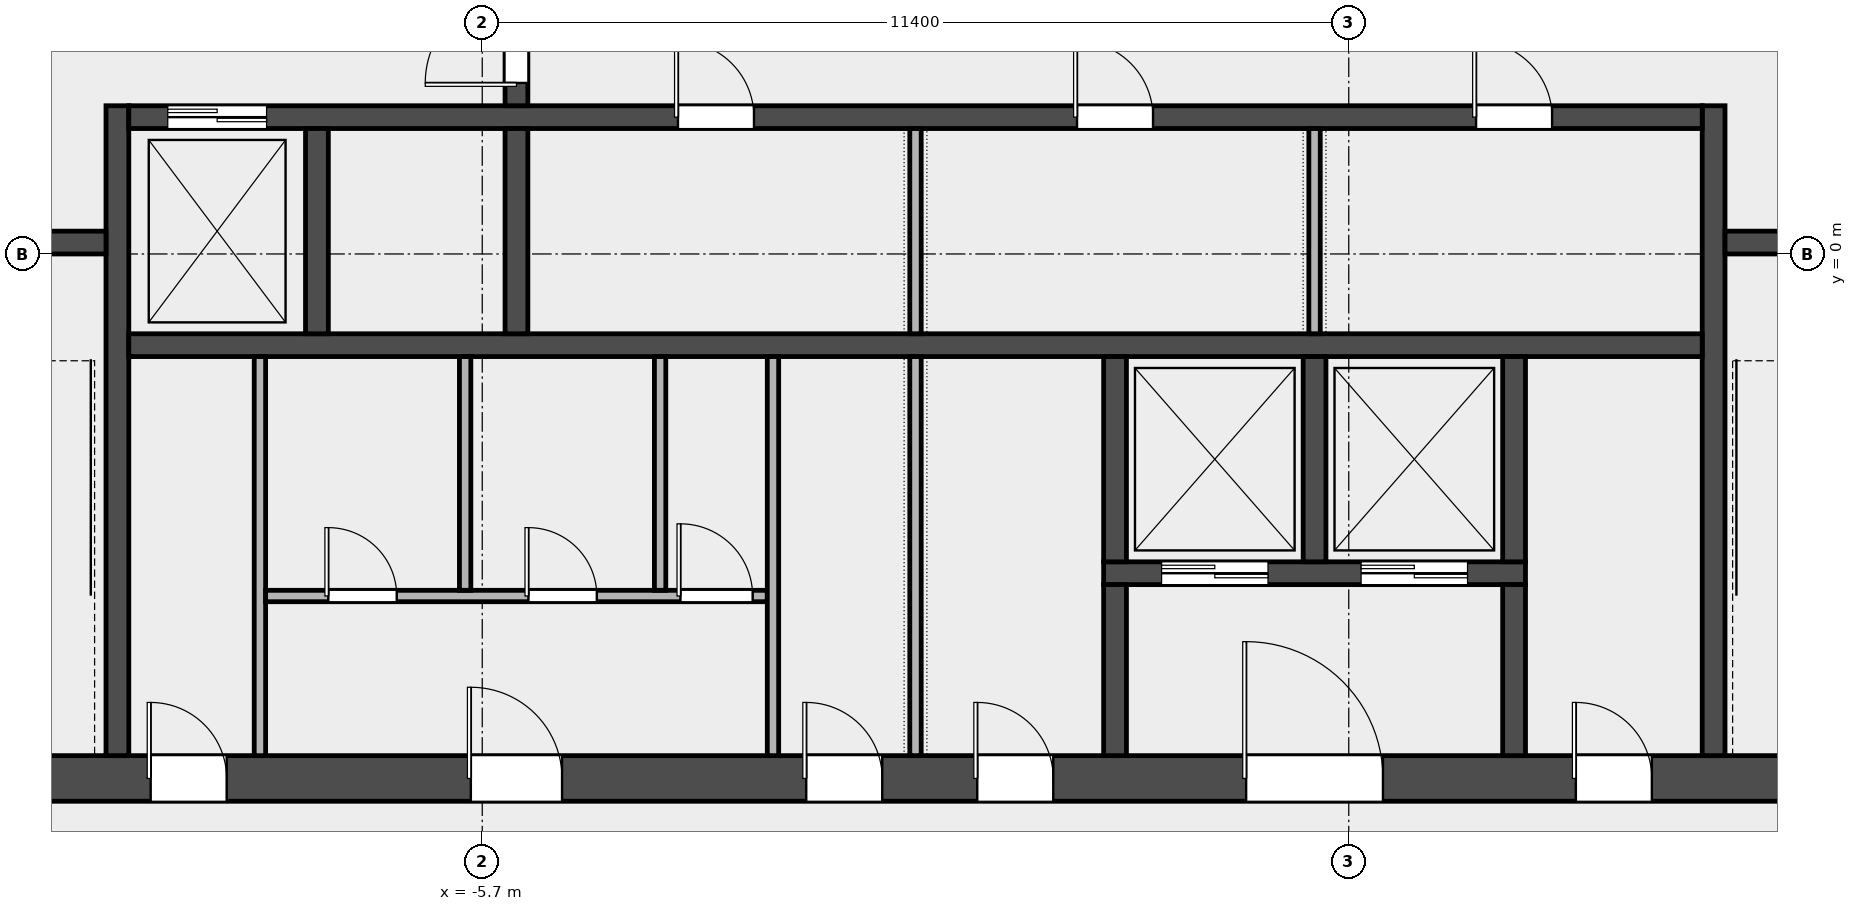
"""IFC4 building model, lengths in metres.
Left out: names, types, materials, properties, quantities, classifications, styles, units other than length and angle.
Written with IfcOpenShell. Run it as: python <this file> out.ifc"""

import sys

from ifc_helpers import new_model, si_unit, direction, frame, frame_2d, origin, place, context, subcontext, project, spatial, rectangle, extrude, element, fill, save


model = new_model("IFC4")
c1 = context("Model", 3, precision=1e-05, world=origin(), true_north=direction((0.0, 1.0)))
c2 = subcontext(c1, "Body", "Model", "MODEL_VIEW")
j1 = project(units=[si_unit("LENGTHUNIT", "METRE"), si_unit("PLANEANGLEUNIT", "RADIAN")], contexts=[c1])
p1 = place(None, origin())
s1 = spatial("IfcSite", under=j1, at=p1, CompositionType="ELEMENT")
p2 = place(p1, origin())
s2 = spatial("IfcBuilding", under=s1, at=p2, CompositionType="ELEMENT")
p3 = place(p2, frame((0.0, 0.0, 271.4)))
s3 = spatial("IfcBuildingStorey", under=s2, at=p3, CompositionType="ELEMENT", Elevation=271.4)
p4 = place(p3, frame((-14.4, -6.9, 0.0), z_axis=(0.0, 0.0, 1.0), x_axis=(1.0, 0.0, 0.0)))
e1 = element("IfcWall", 1, at=p4, inside=s3, PredefinedType="SHEAR", context=c2, shape_type="SweptSolid", body=[
    extrude(rectangle(XDim=28.8, YDim=0.6, at=frame_2d((14.4, 0.0))), origin(), (0.0, 0.0, 1.0), 3.7),
])
p5 = place(p4, frame((4.337, 0.0, 0.0)))
e2 = element("IfcOpeningElement", 2, at=p5, cuts=e1, PredefinedType="OPENING", context=c2, shape_type="SweptSolid", body=[
    extrude(rectangle(XDim=1.0, YDim=2.1, at=frame_2d((0.5, 1.05))), frame((0.0, 0.312, 0.0), z_axis=(0.0, -1.0, 0.0), x_axis=(1.0, 0.0, 0.0)), (0.0, 0.0, 1.0), 0.624),
])
p6 = place(p4, frame((8.55, 0.0, 0.0)))
e3 = element("IfcOpeningElement", 3, at=p6, cuts=e1, PredefinedType="OPENING", context=c2, shape_type="SweptSolid", body=[
    extrude(rectangle(XDim=1.2, YDim=2.1, at=frame_2d((0.6, 1.05))), frame((0.0, 0.312, 0.0), z_axis=(0.0, -1.0, 0.0), x_axis=(1.0, 0.0, 0.0)), (0.0, 0.0, 1.0), 0.624),
])
p7 = place(p4, frame((12.962, 0.0, 0.0)))
e4 = element("IfcOpeningElement", 4, at=p7, cuts=e1, PredefinedType="OPENING", context=c2, shape_type="SweptSolid", body=[
    extrude(rectangle(XDim=1.0, YDim=2.1, at=frame_2d((0.5, 1.05))), frame((0.0, 0.312, 0.0), z_axis=(0.0, -1.0, 0.0), x_axis=(1.0, 0.0, 0.0)), (0.0, 0.0, 1.0), 0.624),
])
p8 = place(p4, frame((15.212, 0.0, 0.0)))
e5 = element("IfcOpeningElement", 5, at=p8, cuts=e1, PredefinedType="OPENING", context=c2, shape_type="SweptSolid", body=[
    extrude(rectangle(XDim=1.0, YDim=2.1, at=frame_2d((0.5, 1.05))), frame((0.0, 0.312, 0.0), z_axis=(0.0, -1.0, 0.0), x_axis=(1.0, 0.0, 0.0)), (0.0, 0.0, 1.0), 0.624),
])
p9 = place(p4, frame((18.75, 0.0, 0.0)))
e6 = element("IfcOpeningElement", 6, at=p9, cuts=e1, PredefinedType="OPENING", context=c2, shape_type="SweptSolid", body=[
    extrude(rectangle(XDim=1.8, YDim=2.1, at=frame_2d((0.9, 1.05))), frame((0.0, 0.312, 0.0), z_axis=(0.0, -1.0, 0.0), x_axis=(1.0, 0.0, 0.0)), (0.0, 0.0, 1.0), 0.624),
])
p10 = place(p4, frame((23.087, 0.0, 0.0)))
e7 = element("IfcOpeningElement", 7, at=p10, cuts=e1, PredefinedType="OPENING", context=c2, shape_type="SweptSolid", body=[
    extrude(rectangle(XDim=1.0, YDim=2.1, at=frame_2d((0.5, 1.05))), frame((0.0, 0.312, 0.0), z_axis=(0.0, -1.0, 0.0), x_axis=(1.0, 0.0, 0.0)), (0.0, 0.0, 1.0), 0.624),
])
for number, where, z_axis, x_axis in (
    (8, (-10.5, -6.6, 0.0), (0.0, 0.0, 1.0), (0.0, 1.0, 0.0)),
    (9, (10.5, -6.6, 0.0), (0.0, 0.0, 1.0), (0.0, 1.0, 0.0)),
):
    element("IfcWall", number, at=place(p3, frame(where, z_axis=z_axis, x_axis=x_axis)), inside=s3, PredefinedType="SHEAR", context=c2, shape_type="SweptSolid", body=[
        extrude(rectangle(XDim=8.55, YDim=0.3, at=frame_2d((4.275, 0.0))), origin(), (0.0, 0.0, 1.0), 3.7),
    ])
p11 = place(p3, frame((-13.8, 0.15, 0.0), z_axis=(0.0, 0.0, 1.0), x_axis=(1.0, 0.0, 0.0)))
e10 = element("IfcWall", 10, at=p11, inside=s3, PredefinedType="SOLIDWALL", context=c2, shape_type="SweptSolid", body=[
    extrude(rectangle(XDim=3.15, YDim=0.3, at=frame_2d((1.575, 0.0))), origin(), (0.0, 0.0, 1.0), 3.7),
])
p12 = place(p11, frame((0.975, 0.0, 0.0)))
e11 = element("IfcOpeningElement", 11, at=p12, cuts=e10, PredefinedType="OPENING", context=c2, shape_type="SweptSolid", body=[
    extrude(rectangle(XDim=1.1, YDim=2.1, at=frame_2d((0.55, 1.05))), frame((0.0, 0.162, 0.0), z_axis=(0.0, -1.0, 0.0), x_axis=(1.0, 0.0, 0.0)), (0.0, 0.0, 1.0), 0.324),
])
p13 = place(p3, frame((10.65, 0.15, 0.0), z_axis=(0.0, 0.0, 1.0), x_axis=(1.0, 0.0, 0.0)))
e12 = element("IfcWall", 12, at=p13, inside=s3, PredefinedType="SOLIDWALL", context=c2, shape_type="SweptSolid", body=[
    extrude(rectangle(XDim=3.15, YDim=0.3, at=frame_2d((1.575, 0.0))), origin(), (0.0, 0.0, 1.0), 3.7),
])
p14 = place(p13, frame((1.025, 0.0, 0.0)))
e13 = element("IfcOpeningElement", 13, at=p14, cuts=e12, PredefinedType="OPENING", context=c2, shape_type="SweptSolid", body=[
    extrude(rectangle(XDim=1.1, YDim=2.1, at=frame_2d((0.55, 1.05))), frame((0.0, 0.162, 0.0), z_axis=(0.0, -1.0, 0.0), x_axis=(1.0, 0.0, 0.0)), (0.0, 0.0, 1.0), 0.324),
])
p15 = place(p3, frame((-10.35, -1.2, 0.0), z_axis=(0.0, 0.0, 1.0), x_axis=(1.0, 0.0, 0.0)))
e14 = element("IfcWall", 14, at=p15, inside=s3, PredefinedType="SOLIDWALL", context=c2, shape_type="SweptSolid", body=[
    extrude(rectangle(XDim=20.7, YDim=0.3, at=frame_2d((10.35, 0.0))), origin(), (0.0, 0.0, 1.0), 3.7),
])
p16 = place(p3, frame((-10.35, 1.8, 0.0), z_axis=(0.0, 0.0, 1.0), x_axis=(1.0, 0.0, 0.0)))
e15 = element("IfcWall", 15, at=p16, inside=s3, PredefinedType="SOLIDWALL", context=c2, shape_type="SweptSolid", body=[
    extrude(rectangle(XDim=20.7, YDim=0.3, at=frame_2d((10.35, 0.0))), origin(), (0.0, 0.0, 1.0), 3.7),
])
p17 = place(p16, frame((0.512, 0.0, 0.0)))
e16 = element("IfcOpeningElement", 16, at=p17, cuts=e15, PredefinedType="OPENING", context=c2, shape_type="SweptSolid", body=[
    extrude(rectangle(XDim=1.3, YDim=2.1, at=frame_2d((0.65, 1.05))), frame((0.0, 0.162, 0.0), z_axis=(0.0, -1.0, 0.0), x_axis=(1.0, 0.0, 0.0)), (0.0, 0.0, 1.0), 0.324),
])
p18 = place(p16, frame((7.225, 0.0, 0.0)))
e17 = element("IfcOpeningElement", 17, at=p18, cuts=e15, PredefinedType="OPENING", context=c2, shape_type="SweptSolid", body=[
    extrude(rectangle(XDim=1.0, YDim=2.1, at=frame_2d((0.5, 1.05))), frame((0.0, 0.162, 0.0), z_axis=(0.0, -1.0, 0.0), x_axis=(1.0, 0.0, 0.0)), (0.0, 0.0, 1.0), 0.324),
])
p19 = place(p16, frame((12.475, 0.0, 0.0)))
e18 = element("IfcOpeningElement", 18, at=p19, cuts=e15, PredefinedType="OPENING", context=c2, shape_type="SweptSolid", body=[
    extrude(rectangle(XDim=1.0, YDim=2.1, at=frame_2d((0.5, 1.05))), frame((0.0, 0.162, 0.0), z_axis=(0.0, -1.0, 0.0), x_axis=(1.0, 0.0, 0.0)), (0.0, 0.0, 1.0), 0.324),
])
p20 = place(p16, frame((17.725, 0.0, 0.0)))
e19 = element("IfcOpeningElement", 19, at=p20, cuts=e15, PredefinedType="OPENING", context=c2, shape_type="SweptSolid", body=[
    extrude(rectangle(XDim=1.0, YDim=2.1, at=frame_2d((0.5, 1.05))), frame((0.0, 0.162, 0.0), z_axis=(0.0, -1.0, 0.0), x_axis=(1.0, 0.0, 0.0)), (0.0, 0.0, 1.0), 0.324),
])
for number, where, z_axis, x_axis in (
    (20, (-7.875, -1.05, 0.0), (0.0, 0.0, 1.0), (0.0, 1.0, 0.0)),
    (21, (-5.25, -1.05, 0.0), (0.0, 0.0, 1.0), (0.0, 1.0, 0.0)),
):
    element("IfcWall", number, at=place(p3, frame(where, z_axis=z_axis, x_axis=x_axis)), inside=s3, PredefinedType="SOLIDWALL", context=c2, shape_type="SweptSolid", body=[
        extrude(rectangle(XDim=2.7, YDim=0.3, at=frame_2d((1.35, 0.0))), origin(), (0.0, 0.0, 1.0), 3.7),
    ])
p21 = place(p3, frame((-5.25, 1.95, 0.0), z_axis=(0.0, 0.0, 1.0), x_axis=(0.0, 1.0, 0.0)))
e22 = element("IfcWall", 22, at=p21, inside=s3, PredefinedType="SOLIDWALL", context=c2, shape_type="SweptSolid", body=[
    extrude(rectangle(XDim=3.3, YDim=0.3, at=frame_2d((1.65, 0.0))), origin(), (0.0, 0.0, 1.0), 3.7),
])
p22 = place(p21, frame((0.3, 0.0, 0.0)))
e23 = element("IfcOpeningElement", 23, at=p22, cuts=e22, PredefinedType="OPENING", context=c2, shape_type="SweptSolid", body=[
    extrude(rectangle(XDim=1.2, YDim=2.1, at=frame_2d((0.6, 1.05))), frame((0.0, 0.162, 0.0), z_axis=(0.0, -1.0, 0.0), x_axis=(1.0, 0.0, 0.0)), (0.0, 0.0, 1.0), 0.324),
])
p23 = place(p21, frame((1.8, 0.0, 0.0)))
e24 = element("IfcOpeningElement", 24, at=p23, cuts=e22, PredefinedType="OPENING", context=c2, shape_type="SweptSolid", body=[
    extrude(rectangle(XDim=1.2, YDim=2.1, at=frame_2d((0.6, 1.05))), frame((0.0, 0.162, 0.0), z_axis=(0.0, -1.0, 0.0), x_axis=(1.0, 0.0, 0.0)), (0.0, 0.0, 1.0), 0.324),
])
p24 = place(p3, frame((2.475, -4.2, 0.0), z_axis=(0.0, 0.0, 1.0), x_axis=(1.0, 0.0, 0.0)))
e25 = element("IfcWall", 25, at=p24, inside=s3, PredefinedType="SOLIDWALL", context=c2, shape_type="SweptSolid", body=[
    extrude(rectangle(XDim=5.55, YDim=0.3, at=frame_2d((2.775, 0.0))), origin(), (0.0, 0.0, 1.0), 3.7),
])
p25 = place(p24, frame((0.762, 0.0, 0.0)))
e26 = element("IfcOpeningElement", 26, at=p25, cuts=e25, PredefinedType="OPENING", context=c2, shape_type="SweptSolid", body=[
    extrude(rectangle(XDim=1.4, YDim=2.1, at=frame_2d((0.7, 1.05))), frame((0.0, 0.162, 0.0), z_axis=(0.0, -1.0, 0.0), x_axis=(1.0, 0.0, 0.0)), (0.0, 0.0, 1.0), 0.324),
])
p26 = place(p24, frame((3.387, 0.0, 0.0)))
e27 = element("IfcOpeningElement", 27, at=p26, cuts=e25, PredefinedType="OPENING", context=c2, shape_type="SweptSolid", body=[
    extrude(rectangle(XDim=1.4, YDim=2.1, at=frame_2d((0.7, 1.05))), frame((0.0, 0.162, 0.0), z_axis=(0.0, -1.0, 0.0), x_axis=(1.0, 0.0, 0.0)), (0.0, 0.0, 1.0), 0.324),
])
p27 = place(p3, frame((2.625, -4.05, 0.0), z_axis=(0.0, 0.0, 1.0), x_axis=(0.0, 1.0, 0.0)))
e28 = element("IfcWall", 28, at=p27, inside=s3, PredefinedType="SOLIDWALL", context=c2, shape_type="SweptSolid", body=[
    extrude(rectangle(XDim=2.7, YDim=0.3, at=frame_2d((1.35, 0.0))), origin(), (0.0, 0.0, 1.0), 3.7),
])
p28 = place(p3, frame((2.625, -6.6, 0.0), z_axis=(0.0, 0.0, 1.0), x_axis=(0.0, 1.0, 0.0)))
e29 = element("IfcWall", 29, at=p28, inside=s3, PredefinedType="SOLIDWALL", context=c2, shape_type="SweptSolid", body=[
    extrude(rectangle(XDim=2.25, YDim=0.3, at=frame_2d((1.125, 0.0))), origin(), (0.0, 0.0, 1.0), 3.7),
])
for number, where, z_axis, x_axis in (
    (30, (5.25, -4.05, 0.0), (0.0, 0.0, 1.0), (0.0, 1.0, 0.0)),
    (31, (7.875, -4.05, 0.0), (0.0, 0.0, 1.0), (0.0, 1.0, 0.0)),
):
    element("IfcWall", number, at=place(p3, frame(where, z_axis=z_axis, x_axis=x_axis)), inside=s3, PredefinedType="SOLIDWALL", context=c2, shape_type="SweptSolid", body=[
        extrude(rectangle(XDim=2.7, YDim=0.3, at=frame_2d((1.35, 0.0))), origin(), (0.0, 0.0, 1.0), 3.7),
    ])
p29 = place(p3, frame((7.875, -6.6, 0.0), z_axis=(0.0, 0.0, 1.0), x_axis=(0.0, 1.0, 0.0)))
e32 = element("IfcWall", 32, at=p29, inside=s3, PredefinedType="SOLIDWALL", context=c2, shape_type="SweptSolid", body=[
    extrude(rectangle(XDim=2.25, YDim=0.3, at=frame_2d((1.125, 0.0))), origin(), (0.0, 0.0, 1.0), 3.7),
])
p30 = place(p3, frame((-8.625, -6.6, 0.0), z_axis=(0.0, 0.0, 1.0), x_axis=(0.0, 1.0, 0.0)))
e33 = element("IfcWall", 33, at=p30, inside=s3, PredefinedType="PARTITIONING", context=c2, shape_type="SweptSolid", body=[
    extrude(rectangle(XDim=5.25, YDim=0.15, at=frame_2d((2.625, 0.0))), origin(), (0.0, 0.0, 1.0), 3.7),
])
p31 = place(p3, frame((-8.55, -4.5, 0.0), z_axis=(0.0, 0.0, 1.0), x_axis=(1.0, 0.0, 0.0)))
e34 = element("IfcWall", 34, at=p31, inside=s3, PredefinedType="PARTITIONING", context=c2, shape_type="SweptSolid", body=[
    extrude(rectangle(XDim=6.6, YDim=0.15, at=frame_2d((3.3, 0.0))), origin(), (0.0, 0.0, 1.0), 3.7),
])
p32 = place(p31, frame((0.825, 0.0, 0.0)))
e35 = element("IfcOpeningElement", 35, at=p32, cuts=e34, PredefinedType="OPENING", context=c2, shape_type="SweptSolid", body=[
    extrude(rectangle(XDim=0.9, YDim=2.1, at=frame_2d((0.45, 1.05))), frame((0.0, 0.087, 0.0), z_axis=(0.0, -1.0, 0.0), x_axis=(1.0, 0.0, 0.0)), (0.0, 0.0, 1.0), 0.174),
])
p33 = place(p31, frame((3.458, 0.0, 0.0)))
e36 = element("IfcOpeningElement", 36, at=p33, cuts=e34, PredefinedType="OPENING", context=c2, shape_type="SweptSolid", body=[
    extrude(rectangle(XDim=0.9, YDim=2.1, at=frame_2d((0.45, 1.05))), frame((0.0, 0.087, 0.0), z_axis=(0.0, -1.0, 0.0), x_axis=(1.0, 0.0, 0.0)), (0.0, 0.0, 1.0), 0.174),
])
p34 = place(p31, frame((5.458, 0.0, 0.0)))
e37 = element("IfcOpeningElement", 37, at=p34, cuts=e34, PredefinedType="OPENING", context=c2, shape_type="SweptSolid", body=[
    extrude(rectangle(XDim=0.95, YDim=2.1, at=frame_2d((0.475, 1.05))), frame((0.0, 0.087, 0.0), z_axis=(0.0, -1.0, 0.0), x_axis=(1.0, 0.0, 0.0)), (0.0, 0.0, 1.0), 0.174),
])
for number, where, z_axis, x_axis in (
    (38, (-5.925, -4.425, 0.0), (0.0, 0.0, 1.0), (0.0, 1.0, 0.0)),
    (39, (-3.36, -4.425, 0.0), (0.0, 0.0, 1.0), (0.0, 1.0, 0.0)),
):
    element("IfcWall", number, at=place(p3, frame(where, z_axis=z_axis, x_axis=x_axis)), inside=s3, PredefinedType="PARTITIONING", context=c2, shape_type="SweptSolid", body=[
        extrude(rectangle(XDim=3.075, YDim=0.15, at=frame_2d((1.538, 0.0))), origin(), (0.0, 0.0, 1.0), 3.7),
    ])
for number, where, z_axis, x_axis in (
    (40, (-1.875, -6.6, 0.0), (0.0, 0.0, 1.0), (0.0, 1.0, 0.0)),
    (41, (0.0, -6.6, 0.0), (0.0, 0.0, 1.0), (0.0, 1.0, 0.0)),
):
    element("IfcWall", number, at=place(p3, frame(where, z_axis=z_axis, x_axis=x_axis)), inside=s3, PredefinedType="PARTITIONING", context=c2, shape_type="SweptSolid", body=[
        extrude(rectangle(XDim=5.25, YDim=0.15, at=frame_2d((2.625, 0.0))), origin(), (0.0, 0.0, 1.0), 3.7),
    ])
for number, where, z_axis, x_axis in (
    (42, (0.0, -1.05, 0.0), (0.0, 0.0, 1.0), (0.0, 1.0, 0.0)),
    (43, (5.25, -1.05, 0.0), (0.0, 0.0, 1.0), (0.0, 1.0, 0.0)),
):
    element("IfcWall", number, at=place(p3, frame(where, z_axis=z_axis, x_axis=x_axis)), inside=s3, PredefinedType="PARTITIONING", context=c2, shape_type="SweptSolid", body=[
        extrude(rectangle(XDim=2.7, YDim=0.15, at=frame_2d((1.35, 0.0))), origin(), (0.0, 0.0, 1.0), 3.7),
    ])
p35 = place(p22, origin())
e44 = element("IfcDoor", 44, at=p35, inside=s3, OperationType="SINGLE_SWING_LEFT", PredefinedType="DOOR", context=c2, shape_type="SweptSolid", body=[
    extrude(rectangle(XDim=1.2, YDim=2.1, at=frame_2d((0.6, 1.05))), frame((0.0, 0.025, 0.0), z_axis=(0.0, -1.0, 0.0), x_axis=(1.0, 0.0, 0.0)), (0.0, 0.0, 1.0), 0.05),
])
fill(e23, e44)
p36 = place(p17, origin())
e45 = element("IfcDoor", 45, at=p36, inside=s3, OperationType="DOUBLE_DOOR_SLIDING", PredefinedType="DOOR", context=c2, shape_type="SweptSolid", body=[
    extrude(rectangle(XDim=1.3, YDim=2.1, at=frame_2d((0.65, 1.05))), frame((0.0, 0.025, 0.0), z_axis=(0.0, -1.0, 0.0), x_axis=(1.0, 0.0, 0.0)), (0.0, 0.0, 1.0), 0.05),
])
fill(e16, e45)
p37 = place(p25, origin())
e46 = element("IfcDoor", 46, at=p37, inside=s3, OperationType="DOUBLE_DOOR_SLIDING", PredefinedType="DOOR", context=c2, shape_type="SweptSolid", body=[
    extrude(rectangle(XDim=1.4, YDim=2.1, at=frame_2d((0.7, 1.05))), frame((0.0, 0.025, 0.0), z_axis=(0.0, -1.0, 0.0), x_axis=(1.0, 0.0, 0.0)), (0.0, 0.0, 1.0), 0.05),
])
fill(e26, e46)
p38 = place(p26, origin())
e47 = element("IfcDoor", 47, at=p38, inside=s3, OperationType="DOUBLE_DOOR_SLIDING", PredefinedType="DOOR", context=c2, shape_type="SweptSolid", body=[
    extrude(rectangle(XDim=1.4, YDim=2.1, at=frame_2d((0.7, 1.05))), frame((0.0, 0.025, 0.0), z_axis=(0.0, -1.0, 0.0), x_axis=(1.0, 0.0, 0.0)), (0.0, 0.0, 1.0), 0.05),
])
fill(e27, e47)
p39 = place(p5, origin())
e48 = element("IfcDoor", 48, at=p39, inside=s3, OperationType="SINGLE_SWING_LEFT", PredefinedType="DOOR", context=c2, shape_type="SweptSolid", body=[
    extrude(rectangle(XDim=1.0, YDim=2.1, at=frame_2d((0.5, 1.05))), frame((0.0, 0.025, 0.0), z_axis=(0.0, -1.0, 0.0), x_axis=(1.0, 0.0, 0.0)), (0.0, 0.0, 1.0), 0.05),
])
fill(e2, e48)
p40 = place(p6, origin())
e49 = element("IfcDoor", 49, at=p40, inside=s3, OperationType="SINGLE_SWING_LEFT", PredefinedType="DOOR", context=c2, shape_type="SweptSolid", body=[
    extrude(rectangle(XDim=1.2, YDim=2.1, at=frame_2d((0.6, 1.05))), frame((0.0, 0.025, 0.0), z_axis=(0.0, -1.0, 0.0), x_axis=(1.0, 0.0, 0.0)), (0.0, 0.0, 1.0), 0.05),
])
fill(e3, e49)
p41 = place(p32, origin())
e50 = element("IfcDoor", 50, at=p41, inside=s3, OperationType="SINGLE_SWING_LEFT", PredefinedType="DOOR", context=c2, shape_type="SweptSolid", body=[
    extrude(rectangle(XDim=0.9, YDim=2.1, at=frame_2d((0.45, 1.05))), frame((0.0, 0.025, 0.0), z_axis=(0.0, -1.0, 0.0), x_axis=(1.0, 0.0, 0.0)), (0.0, 0.0, 1.0), 0.05),
])
fill(e35, e50)
p42 = place(p33, origin())
e51 = element("IfcDoor", 51, at=p42, inside=s3, OperationType="SINGLE_SWING_LEFT", PredefinedType="DOOR", context=c2, shape_type="SweptSolid", body=[
    extrude(rectangle(XDim=0.9, YDim=2.1, at=frame_2d((0.45, 1.05))), frame((0.0, 0.025, 0.0), z_axis=(0.0, -1.0, 0.0), x_axis=(1.0, 0.0, 0.0)), (0.0, 0.0, 1.0), 0.05),
])
fill(e36, e51)
p43 = place(p34, origin())
e52 = element("IfcDoor", 52, at=p43, inside=s3, OperationType="SINGLE_SWING_LEFT", PredefinedType="DOOR", context=c2, shape_type="SweptSolid", body=[
    extrude(rectangle(XDim=0.95, YDim=2.1, at=frame_2d((0.475, 1.05))), frame((0.0, 0.025, 0.0), z_axis=(0.0, -1.0, 0.0), x_axis=(1.0, 0.0, 0.0)), (0.0, 0.0, 1.0), 0.05),
])
fill(e37, e52)
p44 = place(p7, origin())
e53 = element("IfcDoor", 53, at=p44, inside=s3, OperationType="SINGLE_SWING_LEFT", PredefinedType="DOOR", context=c2, shape_type="SweptSolid", body=[
    extrude(rectangle(XDim=1.0, YDim=2.1, at=frame_2d((0.5, 1.05))), frame((0.0, 0.025, 0.0), z_axis=(0.0, -1.0, 0.0), x_axis=(1.0, 0.0, 0.0)), (0.0, 0.0, 1.0), 0.05),
])
fill(e4, e53)
p45 = place(p8, origin())
e54 = element("IfcDoor", 54, at=p45, inside=s3, OperationType="SINGLE_SWING_LEFT", PredefinedType="DOOR", context=c2, shape_type="SweptSolid", body=[
    extrude(rectangle(XDim=1.0, YDim=2.1, at=frame_2d((0.5, 1.05))), frame((0.0, 0.025, 0.0), z_axis=(0.0, -1.0, 0.0), x_axis=(1.0, 0.0, 0.0)), (0.0, 0.0, 1.0), 0.05),
])
fill(e5, e54)
p46 = place(p9, origin())
e55 = element("IfcDoor", 55, at=p46, inside=s3, OperationType="DOUBLE_DOOR_SINGLE_SWING", PredefinedType="DOOR", context=c2, shape_type="SweptSolid", body=[
    extrude(rectangle(XDim=1.8, YDim=2.1, at=frame_2d((0.9, 1.05))), frame((0.0, 0.025, 0.0), z_axis=(0.0, -1.0, 0.0), x_axis=(1.0, 0.0, 0.0)), (0.0, 0.0, 1.0), 0.05),
])
fill(e6, e55)
p47 = place(p10, origin())
e56 = element("IfcDoor", 56, at=p47, inside=s3, OperationType="SINGLE_SWING_LEFT", PredefinedType="DOOR", context=c2, shape_type="SweptSolid", body=[
    extrude(rectangle(XDim=1.0, YDim=2.1, at=frame_2d((0.5, 1.05))), frame((0.0, 0.025, 0.0), z_axis=(0.0, -1.0, 0.0), x_axis=(1.0, 0.0, 0.0)), (0.0, 0.0, 1.0), 0.05),
])
fill(e7, e56)
p48 = place(p18, origin())
e57 = element("IfcDoor", 57, at=p48, inside=s3, OperationType="SINGLE_SWING_LEFT", PredefinedType="DOOR", context=c2, shape_type="SweptSolid", body=[
    extrude(rectangle(XDim=1.0, YDim=2.1, at=frame_2d((0.5, 1.05))), frame((0.0, 0.025, 0.0), z_axis=(0.0, -1.0, 0.0), x_axis=(1.0, 0.0, 0.0)), (0.0, 0.0, 1.0), 0.05),
])
fill(e17, e57)
p49 = place(p19, origin())
e58 = element("IfcDoor", 58, at=p49, inside=s3, OperationType="SINGLE_SWING_LEFT", PredefinedType="DOOR", context=c2, shape_type="SweptSolid", body=[
    extrude(rectangle(XDim=1.0, YDim=2.1, at=frame_2d((0.5, 1.05))), frame((0.0, 0.025, 0.0), z_axis=(0.0, -1.0, 0.0), x_axis=(1.0, 0.0, 0.0)), (0.0, 0.0, 1.0), 0.05),
])
fill(e18, e58)
p50 = place(p20, origin())
e59 = element("IfcDoor", 59, at=p50, inside=s3, OperationType="SINGLE_SWING_LEFT", PredefinedType="DOOR", context=c2, shape_type="SweptSolid", body=[
    extrude(rectangle(XDim=1.0, YDim=2.1, at=frame_2d((0.5, 1.05))), frame((0.0, 0.025, 0.0), z_axis=(0.0, -1.0, 0.0), x_axis=(1.0, 0.0, 0.0)), (0.0, 0.0, 1.0), 0.05),
])
fill(e19, e59)
save(model, sys.argv[1])
